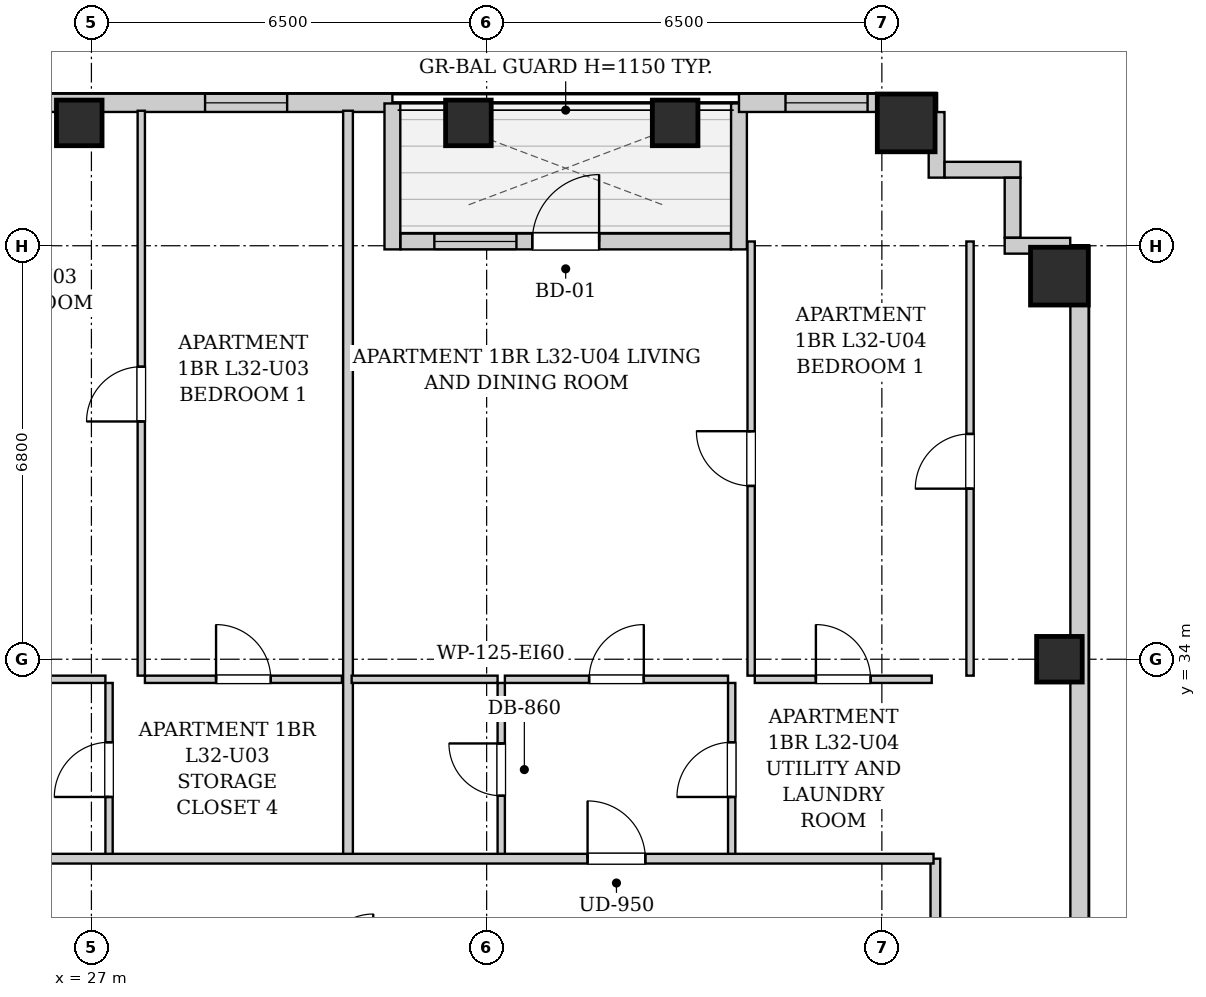
"""IFC4 building model, lengths in metres.
Left out: names, types, materials, properties, quantities, classifications, styles, units other than length and angle.
Written with IfcOpenShell. Run it as: python <this file> out.ifc"""

import sys

from ifc_helpers import new_model, si_unit, direction, frame, frame_2d, origin, origin_2d, place, context, subcontext, project, spatial, rectangle, extrude, element, fill, save


model = new_model("IFC4")
c1 = context("Model", 3, precision=1e-05, world=origin(), true_north=direction((0.0, 1.0)))
c2 = subcontext(c1, "Body", "Model", "MODEL_VIEW")
j1 = project(units=[si_unit("LENGTHUNIT", "METRE"), si_unit("PLANEANGLEUNIT", "RADIAN")], contexts=[c1])
p1 = place(None, origin())
s1 = spatial("IfcSite", under=j1, at=p1, CompositionType="ELEMENT")
p2 = place(p1, origin())
s2 = spatial("IfcBuilding", under=s1, at=p2, CompositionType="ELEMENT")
p3 = place(p2, frame((0.0, 0.0, 113.5)))
s3 = spatial("IfcBuildingStorey", under=s2, at=p3, CompositionType="ELEMENT", Elevation=113.5)
for number, where, z_axis, x_axis in (
    (1, (26.8, 42.82, 0.0), (0.0, 0.0, 1.0), (1.0, 0.0, 0.0)),
    (2, (33.2, 42.82, 0.0), (0.0, 0.0, 1.0), (1.0, 0.0, 0.0)),
    (3, (36.6, 42.82, 0.0), (0.0, 0.0, 1.0), (1.0, 0.0, 0.0)),
):
    element("IfcColumn", number, at=place(p3, frame(where, z_axis=z_axis, x_axis=x_axis)), inside=s3, PredefinedType="COLUMN", context=c2, shape_type="SweptSolid", body=[
        extrude(rectangle(XDim=0.75, YDim=0.75, at=origin_2d()), origin(), (0.0, 0.0, 1.0), 3.2),
    ])
p4 = place(p3, frame((40.4, 42.82, 0.0), z_axis=(0.0, 0.0, 1.0), x_axis=(1.0, 0.0, 0.0)))
e4 = element("IfcColumn", 4, at=p4, inside=s3, PredefinedType="COLUMN", context=c2, shape_type="SweptSolid", body=[
    extrude(rectangle(XDim=0.95, YDim=0.95, at=origin_2d()), origin(), (0.0, 0.0, 1.0), 3.2),
])
p5 = place(p3, frame((42.92, 34.0, 0.0), z_axis=(0.0, 0.0, 1.0), x_axis=(1.0, 0.0, 0.0)))
e5 = element("IfcColumn", 5, at=p5, inside=s3, PredefinedType="COLUMN", context=c2, shape_type="SweptSolid", body=[
    extrude(rectangle(XDim=0.75, YDim=0.75, at=origin_2d()), origin(), (0.0, 0.0, 1.0), 3.2),
])
p6 = place(p3, frame((42.92, 40.3, 0.0), z_axis=(0.0, 0.0, 1.0), x_axis=(1.0, 0.0, 0.0)))
e6 = element("IfcColumn", 6, at=p6, inside=s3, PredefinedType="COLUMN", context=c2, shape_type="SweptSolid", body=[
    extrude(rectangle(XDim=0.95, YDim=0.95, at=origin_2d()), origin(), (0.0, 0.0, 1.0), 3.2),
])
p7 = place(p3, frame((10.0, 43.15, 0.0), z_axis=(0.0, 0.0, 1.0), x_axis=(1.0, 0.0, 0.0)))
e7 = element("IfcWall", 7, at=p7, inside=s3, PredefinedType="SOLIDWALL", context=c2, shape_type="SweptSolid", body=[
    extrude(rectangle(XDim=21.95, YDim=0.3, at=frame_2d((10.975, 0.0))), origin(), (0.0, 0.0, 1.0), 2.94),
])
p8 = place(p7, frame((5.489, 0.0, 0.55)))
e8 = element("IfcOpeningElement", 8, at=p8, cuts=e7, PredefinedType="OPENING", context=c2, shape_type="SweptSolid", body=[
    extrude(rectangle(XDim=1.35, YDim=1.2, at=frame_2d((0.675, 0.6))), frame((0.0, 0.16, 0.0), z_axis=(0.0, -1.0, 0.0), x_axis=(1.0, 0.0, 0.0)), (0.0, 0.0, 1.0), 0.32),
])
p9 = place(p7, frame((9.322, 0.0, 0.55)))
e9 = element("IfcOpeningElement", 9, at=p9, cuts=e7, PredefinedType="OPENING", context=c2, shape_type="SweptSolid", body=[
    extrude(rectangle(XDim=1.35, YDim=1.2, at=frame_2d((0.675, 0.6))), frame((0.0, 0.16, 0.0), z_axis=(0.0, -1.0, 0.0), x_axis=(1.0, 0.0, 0.0)), (0.0, 0.0, 1.0), 0.32),
])
p10 = place(p7, frame((18.869, 0.0, 0.55)))
e10 = element("IfcOpeningElement", 10, at=p10, cuts=e7, PredefinedType="OPENING", context=c2, shape_type="SweptSolid", body=[
    extrude(rectangle(XDim=1.35, YDim=1.2, at=frame_2d((0.675, 0.6))), frame((0.0, 0.16, 0.0), z_axis=(0.0, -1.0, 0.0), x_axis=(1.0, 0.0, 0.0)), (0.0, 0.0, 1.0), 0.32),
])
p11 = place(p3, frame((31.95, 43.14, 0.0), z_axis=(0.0, 0.0, 1.0), x_axis=(0.0, -1.0, 0.0)))
e11 = element("IfcWall", 11, at=p11, inside=s3, PredefinedType="SOLIDWALL", context=c2, shape_type="SweptSolid", body=[
    extrude(rectangle(XDim=2.4, YDim=0.26, at=frame_2d((1.2, 0.0))), origin(), (0.0, 0.0, 1.0), 2.94),
])
p12 = place(p3, frame((32.084, 40.87, 0.0), z_axis=(0.0, 0.0, 1.0), x_axis=(1.0, 0.0, 0.0)))
e12 = element("IfcWall", 12, at=p12, inside=s3, PredefinedType="SOLIDWALL", context=c2, shape_type="SweptSolid", body=[
    extrude(rectangle(XDim=5.432, YDim=0.26, at=frame_2d((2.716, 0.0))), origin(), (0.0, 0.0, 1.0), 2.94),
])
p13 = place(p12, frame((2.166, 0.0, 0.0)))
e13 = element("IfcOpeningElement", 13, at=p13, cuts=e12, PredefinedType="OPENING", context=c2, shape_type="SweptSolid", body=[
    extrude(rectangle(XDim=1.1, YDim=2.0, at=frame_2d((0.55, 1.0))), frame((0.0, 0.14, 0.0), z_axis=(0.0, -1.0, 0.0), x_axis=(1.0, 0.0, 0.0)), (0.0, 0.0, 1.0), 0.28),
])
p14 = place(p12, frame((0.556, 0.0, 0.55)))
e14 = element("IfcOpeningElement", 14, at=p14, cuts=e12, PredefinedType="OPENING", context=c2, shape_type="SweptSolid", body=[
    extrude(rectangle(XDim=1.35, YDim=1.2, at=frame_2d((0.675, 0.6))), frame((0.0, 0.14, 0.0), z_axis=(0.0, -1.0, 0.0), x_axis=(1.0, 0.0, 0.0)), (0.0, 0.0, 1.0), 0.28),
])
p15 = place(p3, frame((37.65, 40.74, 0.0), z_axis=(0.0, 0.0, 1.0), x_axis=(0.0, 1.0, 0.0)))
e15 = element("IfcWall", 15, at=p15, inside=s3, PredefinedType="SOLIDWALL", context=c2, shape_type="SweptSolid", body=[
    extrude(rectangle(XDim=2.4, YDim=0.26, at=frame_2d((1.2, 0.0))), origin(), (0.0, 0.0, 1.0), 2.94),
])
p16 = place(p3, frame((37.65, 43.15, 0.0), z_axis=(0.0, 0.0, 1.0), x_axis=(1.0, 0.0, 0.0)))
e16 = element("IfcWall", 16, at=p16, inside=s3, PredefinedType="SOLIDWALL", context=c2, shape_type="SweptSolid", body=[
    extrude(rectangle(XDim=3.25, YDim=0.3, at=frame_2d((1.625, 0.0))), origin(), (0.0, 0.0, 1.0), 2.94),
])
p17 = place(p16, frame((0.765, 0.0, 0.55)))
e17 = element("IfcOpeningElement", 17, at=p17, cuts=e16, PredefinedType="OPENING", context=c2, shape_type="SweptSolid", body=[
    extrude(rectangle(XDim=1.35, YDim=1.2, at=frame_2d((0.675, 0.6))), frame((0.0, 0.16, 0.0), z_axis=(0.0, -1.0, 0.0), x_axis=(1.0, 0.0, 0.0)), (0.0, 0.0, 1.0), 0.32),
])
p18 = place(p3, frame((43.25, 40.8, 0.0), z_axis=(0.0, 0.0, 1.0), x_axis=(0.0, -1.0, 0.0)))
e18 = element("IfcWall", 18, at=p18, inside=s3, PredefinedType="SOLIDWALL", context=c2, shape_type="SweptSolid", body=[
    extrude(rectangle(XDim=12.6, YDim=0.3, at=frame_2d((6.3, 0.0))), origin(), (0.0, 0.0, 1.0), 2.94),
])
p19 = place(p3, frame((40.9, 42.998, 0.0), z_axis=(0.0, 0.0, 1.0), x_axis=(0.0, -1.0, 0.0)))
e19 = element("IfcWall", 19, at=p19, inside=s3, PredefinedType="SOLIDWALL", context=c2, shape_type="SweptSolid", body=[
    extrude(rectangle(XDim=1.078, YDim=0.26, at=frame_2d((0.539, 0.0))), origin(), (0.0, 0.0, 1.0), 2.94),
])
p20 = place(p3, frame((41.032, 42.05, 0.0), z_axis=(0.0, 0.0, 1.0), x_axis=(1.0, 0.0, 0.0)))
e20 = element("IfcWall", 20, at=p20, inside=s3, PredefinedType="SOLIDWALL", context=c2, shape_type="SweptSolid", body=[
    extrude(rectangle(XDim=1.248, YDim=0.26, at=frame_2d((0.624, 0.0))), origin(), (0.0, 0.0, 1.0), 2.94),
])
p21 = place(p3, frame((42.15, 41.918, 0.0), z_axis=(0.0, 0.0, 1.0), x_axis=(0.0, -1.0, 0.0)))
e21 = element("IfcWall", 21, at=p21, inside=s3, PredefinedType="SOLIDWALL", context=c2, shape_type="SweptSolid", body=[
    extrude(rectangle(XDim=0.986, YDim=0.26, at=frame_2d((0.493, 0.0))), origin(), (0.0, 0.0, 1.0), 2.94),
])
p22 = place(p3, frame((42.02, 40.8, 0.0), z_axis=(0.0, 0.0, 1.0), x_axis=(1.0, 0.0, 0.0)))
e22 = element("IfcWall", 22, at=p22, inside=s3, PredefinedType="SOLIDWALL", context=c2, shape_type="SweptSolid", body=[
    extrude(rectangle(XDim=1.078, YDim=0.26, at=frame_2d((0.539, 0.0))), origin(), (0.0, 0.0, 1.0), 2.94),
])
p23 = place(p3, frame((40.88, 28.98, 0.0), z_axis=(0.0, 0.0, 1.0), x_axis=(0.0, 1.0, 0.0)))
e23 = element("IfcWall", 23, at=p23, inside=s3, PredefinedType="PARTITIONING", context=c2, shape_type="SweptSolid", body=[
    extrude(rectangle(XDim=1.74, YDim=0.16, at=frame_2d((0.87, 0.0))), origin(), (0.0, 0.0, 1.0), 2.94),
])
p24 = place(p3, frame((27.29, 30.76, 0.0), z_axis=(0.0, 0.0, 1.0), x_axis=(0.0, 1.0, 0.0)))
e24 = element("IfcWall", 24, at=p24, inside=s3, PredefinedType="PARTITIONING", context=c2, shape_type="SweptSolid", body=[
    extrude(rectangle(XDim=2.85, YDim=0.12, at=frame_2d((1.425, 0.0))), origin(), (0.0, 0.0, 1.0), 2.94),
])
p25 = place(p24, frame((0.975, 0.0, 0.0)))
e25 = element("IfcOpeningElement", 25, at=p25, cuts=e24, PredefinedType="OPENING", context=c2, shape_type="SweptSolid", body=[
    extrude(rectangle(XDim=0.9, YDim=2.05, at=frame_2d((0.45, 1.025))), frame((0.0, 0.07, 0.0), z_axis=(0.0, -1.0, 0.0), x_axis=(1.0, 0.0, 0.0)), (0.0, 0.0, 1.0), 0.14),
])
p26 = place(p3, frame((23.63, 33.67, 0.0), z_axis=(0.0, 0.0, 1.0), x_axis=(1.0, 0.0, 0.0)))
e26 = element("IfcWall", 26, at=p26, inside=s3, PredefinedType="PARTITIONING", context=c2, shape_type="SweptSolid", body=[
    extrude(rectangle(XDim=3.6, YDim=0.12, at=frame_2d((1.8, 0.0))), origin(), (0.0, 0.0, 1.0), 2.94),
])
p27 = place(p26, frame((1.35, 0.0, 0.0)))
e27 = element("IfcOpeningElement", 27, at=p27, cuts=e26, PredefinedType="OPENING", context=c2, shape_type="SweptSolid", body=[
    extrude(rectangle(XDim=0.9, YDim=2.05, at=frame_2d((0.45, 1.025))), frame((0.0, 0.07, 0.0), z_axis=(0.0, -1.0, 0.0), x_axis=(1.0, 0.0, 0.0)), (0.0, 0.0, 1.0), 0.14),
])
p28 = place(p3, frame((27.88, 33.67, 0.0), z_axis=(0.0, 0.0, 1.0), x_axis=(1.0, 0.0, 0.0)))
e28 = element("IfcWall", 28, at=p28, inside=s3, PredefinedType="PARTITIONING", context=c2, shape_type="SweptSolid", body=[
    extrude(rectangle(XDim=3.24, YDim=0.12, at=frame_2d((1.62, 0.0))), origin(), (0.0, 0.0, 1.0), 2.94),
])
p29 = place(p28, frame((1.17, 0.0, 0.0)))
e29 = element("IfcOpeningElement", 29, at=p29, cuts=e28, PredefinedType="OPENING", context=c2, shape_type="SweptSolid", body=[
    extrude(rectangle(XDim=0.9, YDim=2.05, at=frame_2d((0.45, 1.025))), frame((0.0, 0.07, 0.0), z_axis=(0.0, -1.0, 0.0), x_axis=(1.0, 0.0, 0.0)), (0.0, 0.0, 1.0), 0.14),
])
p30 = place(p3, frame((27.82, 33.73, 0.0), z_axis=(0.0, 0.0, 1.0), x_axis=(0.0, 1.0, 0.0)))
e30 = element("IfcWall", 30, at=p30, inside=s3, PredefinedType="PARTITIONING", context=c2, shape_type="SweptSolid", body=[
    extrude(rectangle(XDim=9.29, YDim=0.12, at=frame_2d((4.645, 0.0))), origin(), (0.0, 0.0, 1.0), 2.94),
])
p31 = place(p30, frame((4.18, 0.0, 0.0)))
e31 = element("IfcOpeningElement", 31, at=p31, cuts=e30, PredefinedType="OPENING", context=c2, shape_type="SweptSolid", body=[
    extrude(rectangle(XDim=0.9, YDim=2.05, at=frame_2d((0.45, 1.025))), frame((0.0, 0.07, 0.0), z_axis=(0.0, -1.0, 0.0), x_axis=(1.0, 0.0, 0.0)), (0.0, 0.0, 1.0), 0.14),
])
p32 = place(p3, frame((31.22, 30.76, 0.0), z_axis=(0.0, 0.0, 1.0), x_axis=(0.0, 1.0, 0.0)))
e32 = element("IfcWall", 32, at=p32, inside=s3, PredefinedType="PARTITIONING", context=c2, shape_type="SweptSolid", body=[
    extrude(rectangle(XDim=12.26, YDim=0.16, at=frame_2d((6.13, 0.0))), origin(), (0.0, 0.0, 1.0), 2.94),
])
p33 = place(p3, frame((33.74, 30.76, 0.0), z_axis=(0.0, 0.0, 1.0), x_axis=(0.0, 1.0, 0.0)))
e33 = element("IfcWall", 33, at=p33, inside=s3, PredefinedType="PARTITIONING", context=c2, shape_type="SweptSolid", body=[
    extrude(rectangle(XDim=2.85, YDim=0.12, at=frame_2d((1.425, 0.0))), origin(), (0.0, 0.0, 1.0), 2.94),
])
p34 = place(p33, frame((0.995, 0.0, 0.0)))
e34 = element("IfcOpeningElement", 34, at=p34, cuts=e33, PredefinedType="OPENING", context=c2, shape_type="SweptSolid", body=[
    extrude(rectangle(XDim=0.86, YDim=2.05, at=frame_2d((0.43, 1.025))), frame((0.0, 0.07, 0.0), z_axis=(0.0, -1.0, 0.0), x_axis=(1.0, 0.0, 0.0)), (0.0, 0.0, 1.0), 0.14),
])
p35 = place(p3, frame((31.28, 33.67, 0.0), z_axis=(0.0, 0.0, 1.0), x_axis=(1.0, 0.0, 0.0)))
e35 = element("IfcWall", 35, at=p35, inside=s3, PredefinedType="PARTITIONING", context=c2, shape_type="SweptSolid", body=[
    extrude(rectangle(XDim=2.4, YDim=0.12, at=frame_2d((1.2, 0.0))), origin(), (0.0, 0.0, 1.0), 2.94),
])
p36 = place(p3, frame((37.53, 30.76, 0.0), z_axis=(0.0, 0.0, 1.0), x_axis=(0.0, 1.0, 0.0)))
e36 = element("IfcWall", 36, at=p36, inside=s3, PredefinedType="PARTITIONING", context=c2, shape_type="SweptSolid", body=[
    extrude(rectangle(XDim=2.85, YDim=0.12, at=frame_2d((1.425, 0.0))), origin(), (0.0, 0.0, 1.0), 2.94),
])
p37 = place(p36, frame((0.975, 0.0, 0.0)))
e37 = element("IfcOpeningElement", 37, at=p37, cuts=e36, PredefinedType="OPENING", context=c2, shape_type="SweptSolid", body=[
    extrude(rectangle(XDim=0.9, YDim=2.05, at=frame_2d((0.45, 1.025))), frame((0.0, 0.07, 0.0), z_axis=(0.0, -1.0, 0.0), x_axis=(1.0, 0.0, 0.0)), (0.0, 0.0, 1.0), 0.14),
])
p38 = place(p3, frame((33.8, 33.67, 0.0), z_axis=(0.0, 0.0, 1.0), x_axis=(1.0, 0.0, 0.0)))
e38 = element("IfcWall", 38, at=p38, inside=s3, PredefinedType="PARTITIONING", context=c2, shape_type="SweptSolid", body=[
    extrude(rectangle(XDim=3.67, YDim=0.12, at=frame_2d((1.835, 0.0))), origin(), (0.0, 0.0, 1.0), 2.94),
])
p39 = place(p38, frame((1.385, 0.0, 0.0)))
e39 = element("IfcOpeningElement", 39, at=p39, cuts=e38, PredefinedType="OPENING", context=c2, shape_type="SweptSolid", body=[
    extrude(rectangle(XDim=0.9, YDim=2.05, at=frame_2d((0.45, 1.025))), frame((0.0, 0.07, 0.0), z_axis=(0.0, -1.0, 0.0), x_axis=(1.0, 0.0, 0.0)), (0.0, 0.0, 1.0), 0.14),
])
p40 = place(p3, frame((37.91, 33.67, 0.0), z_axis=(0.0, 0.0, 1.0), x_axis=(1.0, 0.0, 0.0)))
e40 = element("IfcWall", 40, at=p40, inside=s3, PredefinedType="PARTITIONING", context=c2, shape_type="SweptSolid", body=[
    extrude(rectangle(XDim=2.91, YDim=0.12, at=frame_2d((1.455, 0.0))), origin(), (0.0, 0.0, 1.0), 2.94),
])
p41 = place(p40, frame((1.005, 0.0, 0.0)))
e41 = element("IfcOpeningElement", 41, at=p41, cuts=e40, PredefinedType="OPENING", context=c2, shape_type="SweptSolid", body=[
    extrude(rectangle(XDim=0.9, YDim=2.05, at=frame_2d((0.45, 1.025))), frame((0.0, 0.07, 0.0), z_axis=(0.0, -1.0, 0.0), x_axis=(1.0, 0.0, 0.0)), (0.0, 0.0, 1.0), 0.14),
])
p42 = place(p3, frame((37.85, 33.73, 0.0), z_axis=(0.0, 0.0, 1.0), x_axis=(0.0, 1.0, 0.0)))
e42 = element("IfcWall", 42, at=p42, inside=s3, PredefinedType="PARTITIONING", context=c2, shape_type="SweptSolid", body=[
    extrude(rectangle(XDim=7.14, YDim=0.12, at=frame_2d((3.57, 0.0))), origin(), (0.0, 0.0, 1.0), 2.94),
])
p43 = place(p42, frame((3.12, 0.0, 0.0)))
e43 = element("IfcOpeningElement", 43, at=p43, cuts=e42, PredefinedType="OPENING", context=c2, shape_type="SweptSolid", body=[
    extrude(rectangle(XDim=0.9, YDim=2.05, at=frame_2d((0.45, 1.025))), frame((0.0, 0.07, 0.0), z_axis=(0.0, -1.0, 0.0), x_axis=(1.0, 0.0, 0.0)), (0.0, 0.0, 1.0), 0.14),
])
p44 = place(p3, frame((41.45, 33.73, 0.0), z_axis=(0.0, 0.0, 1.0), x_axis=(0.0, 1.0, 0.0)))
e44 = element("IfcWall", 44, at=p44, inside=s3, PredefinedType="PARTITIONING", context=c2, shape_type="SweptSolid", body=[
    extrude(rectangle(XDim=7.14, YDim=0.12, at=frame_2d((3.57, 0.0))), origin(), (0.0, 0.0, 1.0), 2.94),
])
p45 = place(p44, frame((3.075, 0.0, 0.0)))
e45 = element("IfcOpeningElement", 45, at=p45, cuts=e44, PredefinedType="OPENING", context=c2, shape_type="SweptSolid", body=[
    extrude(rectangle(XDim=0.9, YDim=2.05, at=frame_2d((0.45, 1.025))), frame((0.0, 0.07, 0.0), z_axis=(0.0, -1.0, 0.0), x_axis=(1.0, 0.0, 0.0)), (0.0, 0.0, 1.0), 0.14),
])
p46 = place(p3, frame((10.05, 30.72, 0.0), z_axis=(0.0, 0.0, 1.0), x_axis=(1.0, 0.0, 0.0)))
e46 = element("IfcWall", 46, at=p46, inside=s3, PredefinedType="PARTITIONING", context=c2, shape_type="SweptSolid", body=[
    extrude(rectangle(XDim=30.8, YDim=0.16, at=frame_2d((15.4, 0.0))), origin(), (0.0, 0.0, 1.0), 2.94),
])
p47 = place(p46, frame((4.035, 0.0, 0.0)))
e47 = element("IfcOpeningElement", 47, at=p47, cuts=e46, PredefinedType="OPENING", context=c2, shape_type="SweptSolid", body=[
    extrude(rectangle(XDim=0.95, YDim=2.1, at=frame_2d((0.475, 1.05))), frame((0.0, 0.09, 0.0), z_axis=(0.0, -1.0, 0.0), x_axis=(1.0, 0.0, 0.0)), (0.0, 0.0, 1.0), 0.18),
])
p48 = place(p46, frame((25.11, 0.0, 0.0)))
e48 = element("IfcOpeningElement", 48, at=p48, cuts=e46, PredefinedType="OPENING", context=c2, shape_type="SweptSolid", body=[
    extrude(rectangle(XDim=0.95, YDim=2.1, at=frame_2d((0.475, 1.05))), frame((0.0, 0.09, 0.0), z_axis=(0.0, -1.0, 0.0), x_axis=(1.0, 0.0, 0.0)), (0.0, 0.0, 1.0), 0.18),
])
p49 = place(p25, origin())
e49 = element("IfcDoor", 49, at=p49, inside=s3, OperationType="SINGLE_SWING_LEFT", PredefinedType="DOOR", context=c2, shape_type="SweptSolid", body=[
    extrude(rectangle(XDim=0.9, YDim=2.05, at=frame_2d((0.45, 1.025))), frame((0.0, 0.025, 0.0), z_axis=(0.0, -1.0, 0.0), x_axis=(1.0, 0.0, 0.0)), (0.0, 0.0, 1.0), 0.05),
])
fill(e25, e49)
p50 = place(p29, origin())
e50 = element("IfcDoor", 50, at=p50, inside=s3, OperationType="SINGLE_SWING_LEFT", PredefinedType="DOOR", context=c2, shape_type="SweptSolid", body=[
    extrude(rectangle(XDim=0.9, YDim=2.05, at=frame_2d((0.45, 1.025))), frame((0.0, 0.025, 0.0), z_axis=(0.0, -1.0, 0.0), x_axis=(1.0, 0.0, 0.0)), (0.0, 0.0, 1.0), 0.05),
])
fill(e29, e50)
p51 = place(p31, origin())
e51 = element("IfcDoor", 51, at=p51, inside=s3, OperationType="SINGLE_SWING_LEFT", PredefinedType="DOOR", context=c2, shape_type="SweptSolid", body=[
    extrude(rectangle(XDim=0.9, YDim=2.05, at=frame_2d((0.45, 1.025))), frame((0.0, 0.025, 0.0), z_axis=(0.0, -1.0, 0.0), x_axis=(1.0, 0.0, 0.0)), (0.0, 0.0, 1.0), 0.05),
])
fill(e31, e51)
p52 = place(p34, origin())
e52 = element("IfcDoor", 52, at=p52, inside=s3, OperationType="SINGLE_SWING_RIGHT", PredefinedType="DOOR", context=c2, shape_type="SweptSolid", body=[
    extrude(rectangle(XDim=0.86, YDim=2.05, at=frame_2d((0.43, 1.025))), frame((0.0, 0.025, 0.0), z_axis=(0.0, -1.0, 0.0), x_axis=(1.0, 0.0, 0.0)), (0.0, 0.0, 1.0), 0.05),
])
fill(e34, e52)
p53 = place(p37, origin())
e53 = element("IfcDoor", 53, at=p53, inside=s3, OperationType="SINGLE_SWING_LEFT", PredefinedType="DOOR", context=c2, shape_type="SweptSolid", body=[
    extrude(rectangle(XDim=0.9, YDim=2.05, at=frame_2d((0.45, 1.025))), frame((0.0, 0.025, 0.0), z_axis=(0.0, -1.0, 0.0), x_axis=(1.0, 0.0, 0.0)), (0.0, 0.0, 1.0), 0.05),
])
fill(e37, e53)
p54 = place(p39, origin())
e54 = element("IfcDoor", 54, at=p54, inside=s3, OperationType="SINGLE_SWING_RIGHT", PredefinedType="DOOR", context=c2, shape_type="SweptSolid", body=[
    extrude(rectangle(XDim=0.9, YDim=2.05, at=frame_2d((0.45, 1.025))), frame((0.0, 0.025, 0.0), z_axis=(0.0, -1.0, 0.0), x_axis=(1.0, 0.0, 0.0)), (0.0, 0.0, 1.0), 0.05),
])
fill(e39, e54)
p55 = place(p41, origin())
e55 = element("IfcDoor", 55, at=p55, inside=s3, OperationType="SINGLE_SWING_LEFT", PredefinedType="DOOR", context=c2, shape_type="SweptSolid", body=[
    extrude(rectangle(XDim=0.9, YDim=2.05, at=frame_2d((0.45, 1.025))), frame((0.0, 0.025, 0.0), z_axis=(0.0, -1.0, 0.0), x_axis=(1.0, 0.0, 0.0)), (0.0, 0.0, 1.0), 0.05),
])
fill(e41, e55)
p56 = place(p43, origin())
e56 = element("IfcDoor", 56, at=p56, inside=s3, OperationType="SINGLE_SWING_RIGHT", PredefinedType="DOOR", context=c2, shape_type="SweptSolid", body=[
    extrude(rectangle(XDim=0.9, YDim=2.05, at=frame_2d((0.45, 1.025))), frame((0.0, 0.025, 0.0), z_axis=(0.0, -1.0, 0.0), x_axis=(1.0, 0.0, 0.0)), (0.0, 0.0, 1.0), 0.05),
])
fill(e43, e56)
p57 = place(p45, origin())
e57 = element("IfcDoor", 57, at=p57, inside=s3, OperationType="SINGLE_SWING_LEFT", PredefinedType="DOOR", context=c2, shape_type="SweptSolid", body=[
    extrude(rectangle(XDim=0.9, YDim=2.05, at=frame_2d((0.45, 1.025))), frame((0.0, 0.025, 0.0), z_axis=(0.0, -1.0, 0.0), x_axis=(1.0, 0.0, 0.0)), (0.0, 0.0, 1.0), 0.05),
])
fill(e45, e57)
p58 = place(p48, origin())
e58 = element("IfcDoor", 58, at=p58, inside=s3, OperationType="SINGLE_SWING_LEFT", PredefinedType="DOOR", context=c2, shape_type="SweptSolid", body=[
    extrude(rectangle(XDim=0.95, YDim=2.1, at=frame_2d((0.475, 1.05))), frame((0.0, 0.025, 0.0), z_axis=(0.0, -1.0, 0.0), x_axis=(1.0, 0.0, 0.0)), (0.0, 0.0, 1.0), 0.05),
])
fill(e48, e58)
p59 = place(p13, origin())
e59 = element("IfcDoor", 59, at=p59, inside=s3, OperationType="SINGLE_SWING_RIGHT", PredefinedType="DOOR", context=c2, shape_type="SweptSolid", body=[
    extrude(rectangle(XDim=1.1, YDim=2.0, at=frame_2d((0.55, 1.0))), frame((0.0, 0.025, 0.0), z_axis=(0.0, -1.0, 0.0), x_axis=(1.0, 0.0, 0.0)), (0.0, 0.0, 1.0), 0.05),
])
fill(e13, e59)
p60 = place(p10, origin())
e60 = element("IfcWindow", 60, at=p60, inside=s3, PartitioningType="SINGLE_PANEL", PredefinedType="WINDOW", context=c2, shape_type="SweptSolid", body=[
    extrude(rectangle(XDim=1.35, YDim=1.2, at=frame_2d((0.675, 0.6))), frame((0.0, 0.03, 0.0), z_axis=(0.0, -1.0, 0.0), x_axis=(1.0, 0.0, 0.0)), (0.0, 0.0, 1.0), 0.06),
])
fill(e10, e60)
p61 = place(p14, origin())
e61 = element("IfcWindow", 61, at=p61, inside=s3, PartitioningType="SINGLE_PANEL", PredefinedType="WINDOW", context=c2, shape_type="SweptSolid", body=[
    extrude(rectangle(XDim=1.35, YDim=1.2, at=frame_2d((0.675, 0.6))), frame((0.0, 0.03, 0.0), z_axis=(0.0, -1.0, 0.0), x_axis=(1.0, 0.0, 0.0)), (0.0, 0.0, 1.0), 0.06),
])
fill(e14, e61)
p62 = place(p17, origin())
e62 = element("IfcWindow", 62, at=p62, inside=s3, PartitioningType="SINGLE_PANEL", PredefinedType="WINDOW", context=c2, shape_type="SweptSolid", body=[
    extrude(rectangle(XDim=1.35, YDim=1.2, at=frame_2d((0.675, 0.6))), frame((0.0, 0.03, 0.0), z_axis=(0.0, -1.0, 0.0), x_axis=(1.0, 0.0, 0.0)), (0.0, 0.0, 1.0), 0.06),
])
fill(e17, e62)
save(model, sys.argv[1])
